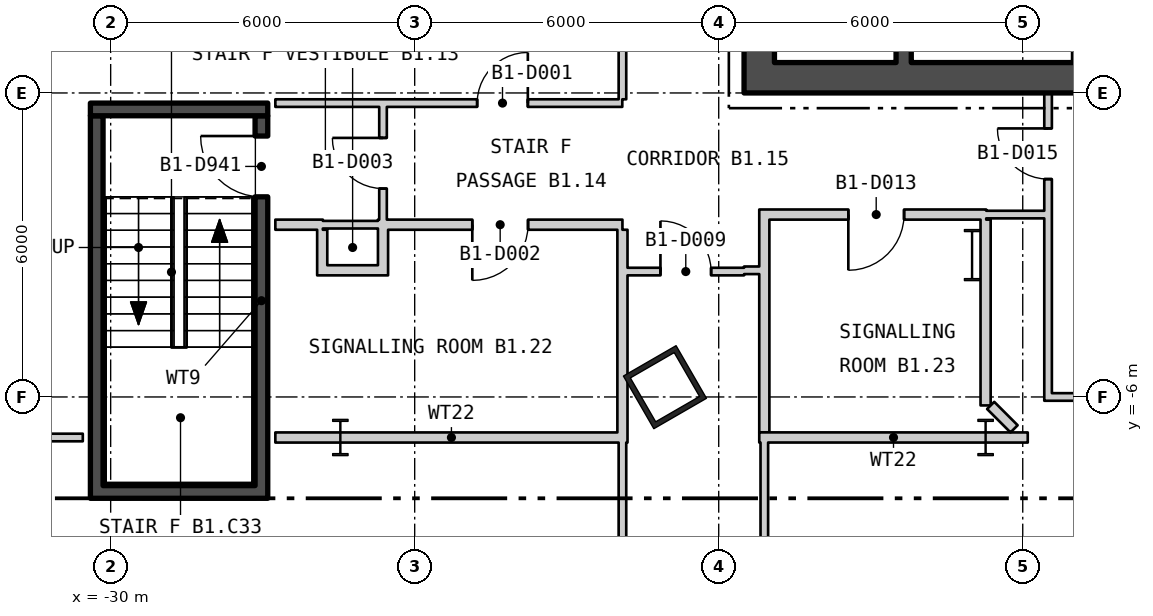
"""IFC4 building model, lengths in metres.
Left out: names, types, materials, properties, quantities, classifications, styles, units other than length and angle.
Written with IfcOpenShell. Run it as: python <this file> out.ifc"""

import sys

from ifc_helpers import new_model, si_unit, direction, frame, frame_2d, origin, origin_2d, place, context, subcontext, project, spatial, rectangle, hollow_rectangle, i_section, extrude, element, fill, save


model = new_model("IFC4")
c1 = context("Model", 3, precision=1e-05, world=origin(), true_north=direction((0.0, 1.0)))
c2 = subcontext(c1, "Body", "Model", "MODEL_VIEW")
j1 = project(units=[si_unit("LENGTHUNIT", "METRE"), si_unit("PLANEANGLEUNIT", "RADIAN")], contexts=[c1])
p1 = place(None, origin())
s1 = spatial("IfcSite", under=j1, at=p1, CompositionType="ELEMENT")
p2 = place(p1, origin())
s2 = spatial("IfcBuilding", under=s1, at=p2, CompositionType="ELEMENT")
p3 = place(p2, frame((0.0, 0.0, -5.7)))
s3 = spatial("IfcBuildingStorey", under=s2, at=p3, CompositionType="ELEMENT", Elevation=-5.7)
p4 = place(p3, frame((-19.061, -5.807, 0.0), z_axis=(0.0, 0.0, 1.0), x_axis=(0.5, -0.866025403784, 0.0)))
e1 = element("IfcColumn", 1, at=p4, inside=s3, PredefinedType="COLUMN", context=c2, shape_type="SweptSolid", body=[
    extrude(hollow_rectangle(XDim=1.2, YDim=1.2, WallThickness=0.1, at=origin_2d()), origin(), (0.0, 0.0, 1.0), 5.7),
])
p5 = place(p3, frame((-13.0, -3.2, 0.0), z_axis=(0.0, 0.0, 1.0), x_axis=(1.0, 0.0, 0.0)))
e2 = element("IfcColumn", 2, at=p5, inside=s3, PredefinedType="COLUMN", context=c2, shape_type="SweptSolid", body=[
    extrude(i_section(OverallWidth=0.302, OverallDepth=1.008, WebThickness=0.021, FlangeThickness=0.04, at=origin_2d()), origin(), (0.0, 0.0, 1.0), 5.7),
])
p6 = place(p3, frame((-25.467, -6.8, 0.0), z_axis=(0.0, 0.0, 1.0), x_axis=(1.0, 0.0, 0.0)))
e3 = element("IfcColumn", 3, at=p6, inside=s3, PredefinedType="COLUMN", context=c2, shape_type="SweptSolid", body=[
    extrude(i_section(OverallWidth=0.304, OverallDepth=0.716, WebThickness=0.021, FlangeThickness=0.04, at=origin_2d()), origin(), (0.0, 0.0, 1.0), 5.7),
])
p7 = place(p3, frame((-12.733, -6.8, 0.0), z_axis=(0.0, 0.0, 1.0), x_axis=(1.0, 0.0, 0.0)))
e4 = element("IfcColumn", 4, at=p7, inside=s3, PredefinedType="COLUMN", context=c2, shape_type="SweptSolid", body=[
    extrude(i_section(OverallWidth=0.304, OverallDepth=0.716, WebThickness=0.021, FlangeThickness=0.04, at=origin_2d()), origin(), (0.0, 0.0, 1.0), 5.25),
])
p8 = place(p3, frame((-17.5, 0.3, 0.0), z_axis=(0.0, 0.0, 1.0), x_axis=(1.0, 0.0, 0.0)))
e5 = element("IfcWall", 5, at=p8, inside=s3, PredefinedType="SHEAR", context=c2, shape_type="SweptSolid", body=[
    extrude(rectangle(XDim=35.0, YDim=0.6, at=frame_2d((17.5, 0.0))), origin(), (0.0, 0.0, 1.0), 5.25),
])
p9 = place(p8, frame((12.0, 0.0, 0.0)))
e6 = element("IfcOpeningElement", 6, at=p9, cuts=e5, PredefinedType="OPENING", context=c2, shape_type="SweptSolid", body=[
    extrude(rectangle(XDim=1.8, YDim=2.4, at=frame_2d((0.9, 1.2))), frame((0.0, 0.31, 0.0), z_axis=(0.0, -1.0, 0.0), x_axis=(1.0, 0.0, 0.0)), (0.0, 0.0, 1.0), 0.62),
])
p10 = place(p8, frame((22.0, 0.0, 0.0)))
e7 = element("IfcOpeningElement", 7, at=p10, cuts=e5, PredefinedType="OPENING", context=c2, shape_type="SweptSolid", body=[
    extrude(rectangle(XDim=1.8, YDim=2.4, at=frame_2d((0.9, 1.2))), frame((0.0, 0.31, 0.0), z_axis=(0.0, -1.0, 0.0), x_axis=(1.0, 0.0, 0.0)), (0.0, 0.0, 1.0), 0.62),
])
p11 = place(p3, frame((-17.2, 0.6, 0.0), z_axis=(0.0, 0.0, 1.0), x_axis=(0.0, 1.0, 0.0)))
e8 = element("IfcWall", 8, at=p11, inside=s3, PredefinedType="SHEAR", context=c2, shape_type="SweptSolid", body=[
    extrude(rectangle(XDim=16.8, YDim=0.6, at=frame_2d((8.4, 0.0))), origin(), (0.0, 0.0, 1.0), 5.25),
])
p12 = place(p11, frame((5.7, 0.0, 0.0)))
e9 = element("IfcOpeningElement", 9, at=p12, cuts=e8, PredefinedType="OPENING", context=c2, shape_type="SweptSolid", body=[
    extrude(rectangle(XDim=1.5, YDim=2.1, at=frame_2d((0.75, 1.05))), frame((0.0, 0.31, 0.0), z_axis=(0.0, -1.0, 0.0), x_axis=(1.0, 0.0, 0.0)), (0.0, 0.0, 1.0), 0.62),
])
p13 = place(p11, frame((0.571, 0.0, 0.0)))
e10 = element("IfcOpeningElement", 10, at=p13, cuts=e8, PredefinedType="OPENING", context=c2, shape_type="SweptSolid", body=[
    extrude(rectangle(XDim=0.9, YDim=2.1, at=frame_2d((0.45, 1.05))), frame((0.0, 0.31, 0.0), z_axis=(0.0, -1.0, 0.0), x_axis=(1.0, 0.0, 0.0)), (0.0, 0.0, 1.0), 0.62),
])
p14 = place(p11, frame((3.421, 0.0, 0.0)))
e11 = element("IfcOpeningElement", 11, at=p14, cuts=e8, PredefinedType="OPENING", context=c2, shape_type="SweptSolid", body=[
    extrude(rectangle(XDim=0.9, YDim=2.1, at=frame_2d((0.45, 1.05))), frame((0.0, 0.31, 0.0), z_axis=(0.0, -1.0, 0.0), x_axis=(1.0, 0.0, 0.0)), (0.0, 0.0, 1.0), 0.62),
])
p15 = place(p11, frame((9.473, 0.0, 0.0)))
e12 = element("IfcOpeningElement", 12, at=p15, cuts=e8, PredefinedType="OPENING", context=c2, shape_type="SweptSolid", body=[
    extrude(rectangle(XDim=1.0, YDim=2.1, at=frame_2d((0.5, 1.05))), frame((0.0, 0.31, 0.0), z_axis=(0.0, -1.0, 0.0), x_axis=(1.0, 0.0, 0.0)), (0.0, 0.0, 1.0), 0.62),
])
p16 = place(p11, frame((14.323, 0.0, 0.0)))
e13 = element("IfcOpeningElement", 13, at=p16, cuts=e8, PredefinedType="OPENING", context=c2, shape_type="SweptSolid", body=[
    extrude(rectangle(XDim=0.9, YDim=2.1, at=frame_2d((0.45, 1.05))), frame((0.0, 0.31, 0.0), z_axis=(0.0, -1.0, 0.0), x_axis=(1.0, 0.0, 0.0)), (0.0, 0.0, 1.0), 0.62),
])
p17 = place(p3, frame((-14.35, 0.6, 0.0), z_axis=(0.0, 0.0, 1.0), x_axis=(0.0, 1.0, 0.0)))
e14 = element("IfcWall", 14, at=p17, inside=s3, PredefinedType="SHEAR", context=c2, shape_type="SweptSolid", body=[
    extrude(rectangle(XDim=16.8, YDim=0.3, at=frame_2d((8.4, 0.0))), origin(), (0.0, 0.0, 1.0), 5.25),
])
p18 = place(p17, frame((5.7, 0.0, 0.0)))
e15 = element("IfcOpeningElement", 15, at=p18, cuts=e14, PredefinedType="OPENING", context=c2, shape_type="SweptSolid", body=[
    extrude(rectangle(XDim=1.5, YDim=2.1, at=frame_2d((0.75, 1.05))), frame((0.0, 0.16, 0.0), z_axis=(0.0, -1.0, 0.0), x_axis=(1.0, 0.0, 0.0)), (0.0, 0.0, 1.0), 0.32),
])
p19 = place(p3, frame((-30.275, -7.75, 0.0), z_axis=(0.0, 0.0, 1.0), x_axis=(0.0, 1.0, 0.0)))
e16 = element("IfcWall", 16, at=p19, inside=s3, PredefinedType="SHEAR", context=c2, shape_type="SweptSolid", body=[
    extrude(rectangle(XDim=7.3, YDim=0.25, at=frame_2d((3.65, 0.0))), origin(), (0.0, 0.0, 1.0), 5.25),
])
p20 = place(p3, frame((-27.025, -7.75, 0.0), z_axis=(0.0, 0.0, 1.0), x_axis=(0.0, 1.0, 0.0)))
e17 = element("IfcWall", 17, at=p20, inside=s3, PredefinedType="SHEAR", context=c2, shape_type="SweptSolid", body=[
    extrude(rectangle(XDim=7.3, YDim=0.25, at=frame_2d((3.65, 0.0))), origin(), (0.0, 0.0, 1.0), 5.25),
])
p21 = place(p20, frame((5.7, 0.0, 0.0)))
e18 = element("IfcOpeningElement", 18, at=p21, cuts=e17, PredefinedType="OPENING", context=c2, shape_type="SweptSolid", body=[
    extrude(rectangle(XDim=1.2, YDim=2.1, at=frame_2d((0.6, 1.05))), frame((0.0, 0.135, 0.0), z_axis=(0.0, -1.0, 0.0), x_axis=(1.0, 0.0, 0.0)), (0.0, 0.0, 1.0), 0.27),
])
for number, where, z_axis, x_axis in (
    (19, (-30.4, -7.875, 0.0), (0.0, 0.0, 1.0), (1.0, 0.0, 0.0)),
    (20, (-30.4, -0.325, 0.0), (0.0, 0.0, 1.0), (1.0, 0.0, 0.0)),
):
    element("IfcWall", number, at=place(p3, frame(where, z_axis=z_axis, x_axis=x_axis)), inside=s3, PredefinedType="SHEAR", context=c2, shape_type="SweptSolid", body=[
        extrude(rectangle(XDim=3.5, YDim=0.25, at=frame_2d((1.75, 0.0))), origin(), (0.0, 0.0, 1.0), 5.25),
    ])
p22 = place(p3, frame((-38.1, -6.8, 0.0), z_axis=(0.0, 0.0, 1.0), x_axis=(1.0, 0.0, 0.0)))
e21 = element("IfcWall", 21, at=p22, inside=s3, PredefinedType="PARTITIONING", context=c2, shape_type="SweptSolid", body=[
    extrude(rectangle(XDim=7.55, YDim=0.15, at=frame_2d((3.775, 0.0))), origin(), (0.0, 0.0, 1.0), 5.25),
])
p23 = place(p3, frame((-26.75, -6.8, 0.0), z_axis=(0.0, 0.0, 1.0), x_axis=(1.0, 0.0, 0.0)))
e22 = element("IfcWall", 22, at=p23, inside=s3, PredefinedType="PARTITIONING", context=c2, shape_type="SweptSolid", body=[
    extrude(rectangle(XDim=6.95, YDim=0.2, at=frame_2d((3.475, 0.0))), origin(), (0.0, 0.0, 1.0), 5.25),
])
p24 = place(p3, frame((-26.75, -2.6, 0.0), z_axis=(0.0, 0.0, 1.0), x_axis=(1.0, 0.0, 0.0)))
e23 = element("IfcWall", 23, at=p24, inside=s3, PredefinedType="PARTITIONING", context=c2, shape_type="SweptSolid", body=[
    extrude(rectangle(XDim=0.937, YDim=0.2, at=frame_2d((0.469, 0.0))), origin(), (0.0, 0.0, 1.0), 5.25),
])
p25 = place(p3, frame((-26.75, -0.2, 0.0), z_axis=(0.0, 0.0, 1.0), x_axis=(1.0, 0.0, 0.0)))
e24 = element("IfcWall", 24, at=p25, inside=s3, PredefinedType="PARTITIONING", context=c2, shape_type="SweptSolid", body=[
    extrude(rectangle(XDim=6.847, YDim=0.15, at=frame_2d((3.424, 0.0))), origin(), (0.0, 0.0, 1.0), 5.25),
])
p26 = place(p25, frame((3.983, 0.0, 0.0)))
e25 = element("IfcOpeningElement", 25, at=p26, cuts=e24, PredefinedType="OPENING", context=c2, shape_type="SweptSolid", body=[
    extrude(rectangle(XDim=1.0, YDim=2.1, at=frame_2d((0.5, 1.05))), frame((0.0, 0.085, 0.0), z_axis=(0.0, -1.0, 0.0), x_axis=(1.0, 0.0, 0.0)), (0.0, 0.0, 1.0), 0.17),
])
p27 = place(p3, frame((-25.925, -3.5, 0.0), z_axis=(0.0, 0.0, 1.0), x_axis=(1.0, 0.0, 0.0)))
e26 = element("IfcWall", 26, at=p27, inside=s3, PredefinedType="PARTITIONING", context=c2, shape_type="SweptSolid", body=[
    extrude(rectangle(XDim=1.4, YDim=0.2, at=frame_2d((0.7, 0.0))), origin(), (0.0, 0.0, 1.0), 5.25),
])
p28 = place(p3, frame((-25.825, -3.4, 0.0), z_axis=(0.0, 0.0, 1.0), x_axis=(0.0, 1.0, 0.0)))
e27 = element("IfcWall", 27, at=p28, inside=s3, PredefinedType="PARTITIONING", context=c2, shape_type="SweptSolid", body=[
    extrude(rectangle(XDim=0.7, YDim=0.2, at=frame_2d((0.35, 0.0))), origin(), (0.0, 0.0, 1.0), 5.25),
])
p29 = place(p3, frame((-25.813, -2.6, 0.0), z_axis=(0.0, 0.0, 1.0), x_axis=(1.0, 0.0, 0.0)))
e28 = element("IfcWall", 28, at=p29, inside=s3, PredefinedType="PARTITIONING", context=c2, shape_type="SweptSolid", body=[
    extrude(rectangle(XDim=1.088, YDim=0.15, at=frame_2d((0.544, 0.0))), origin(), (0.0, 0.0, 1.0), 5.25),
])
p30 = place(p3, frame((-24.725, -2.6, 0.0), z_axis=(0.0, 0.0, 1.0), x_axis=(1.0, 0.0, 0.0)))
e29 = element("IfcWall", 29, at=p30, inside=s3, PredefinedType="PARTITIONING", context=c2, shape_type="SweptSolid", body=[
    extrude(rectangle(XDim=4.825, YDim=0.2, at=frame_2d((2.413, 0.0))), origin(), (0.0, 0.0, 1.0), 5.25),
])
p31 = place(p30, frame((1.862, 0.0, 0.0)))
e30 = element("IfcOpeningElement", 30, at=p31, cuts=e29, PredefinedType="OPENING", context=c2, shape_type="SweptSolid", body=[
    extrude(rectangle(XDim=1.1, YDim=2.1, at=frame_2d((0.55, 1.05))), frame((0.0, 0.11, 0.0), z_axis=(0.0, -1.0, 0.0), x_axis=(1.0, 0.0, 0.0)), (0.0, 0.0, 1.0), 0.22),
])
p32 = place(p3, frame((-24.625, -3.4, 0.0), z_axis=(0.0, 0.0, 1.0), x_axis=(0.0, 1.0, 0.0)))
e31 = element("IfcWall", 31, at=p32, inside=s3, PredefinedType="PARTITIONING", context=c2, shape_type="SweptSolid", body=[
    extrude(rectangle(XDim=0.7, YDim=0.2, at=frame_2d((0.35, 0.0))), origin(), (0.0, 0.0, 1.0), 5.25),
])
p33 = place(p3, frame((-24.625, -2.5, 0.0), z_axis=(0.0, 0.0, 1.0), x_axis=(0.0, 1.0, 0.0)))
e32 = element("IfcWall", 32, at=p33, inside=s3, PredefinedType="PARTITIONING", context=c2, shape_type="SweptSolid", body=[
    extrude(rectangle(XDim=2.225, YDim=0.15, at=frame_2d((1.113, 0.0))), origin(), (0.0, 0.0, 1.0), 5.25),
])
p34 = place(p33, frame((0.613, 0.0, 0.0)))
e33 = element("IfcOpeningElement", 33, at=p34, cuts=e32, PredefinedType="OPENING", context=c2, shape_type="SweptSolid", body=[
    extrude(rectangle(XDim=1.0, YDim=2.1, at=frame_2d((0.5, 1.05))), frame((0.0, 0.085, 0.0), z_axis=(0.0, -1.0, 0.0), x_axis=(1.0, 0.0, 0.0)), (0.0, 0.0, 1.0), 0.17),
])
p35 = place(p3, frame((-19.9, -23.775, 0.0), z_axis=(0.0, 0.0, 1.0), x_axis=(0.0, 1.0, 0.0)))
e34 = element("IfcWall", 34, at=p35, inside=s3, PredefinedType="PARTITIONING", context=c2, shape_type="SweptSolid", body=[
    extrude(rectangle(XDim=16.875, YDim=0.15, at=frame_2d((8.438, 0.0))), origin(), (0.0, 0.0, 1.0), 5.25),
])
p36 = place(p35, frame((2.993, 0.0, 0.0)))
e35 = element("IfcOpeningElement", 35, at=p36, cuts=e34, PredefinedType="OPENING", context=c2, shape_type="SweptSolid", body=[
    extrude(rectangle(XDim=1.0, YDim=2.1, at=frame_2d((0.5, 1.05))), frame((0.0, 0.085, 0.0), z_axis=(0.0, -1.0, 0.0), x_axis=(1.0, 0.0, 0.0)), (0.0, 0.0, 1.0), 0.17),
])
p37 = place(p35, frame((12.35, 0.0, 0.0)))
e36 = element("IfcOpeningElement", 36, at=p37, cuts=e34, PredefinedType="OPENING", context=c2, shape_type="SweptSolid", body=[
    extrude(rectangle(XDim=1.0, YDim=2.1, at=frame_2d((0.5, 1.05))), frame((0.0, 0.085, 0.0), z_axis=(0.0, -1.0, 0.0), x_axis=(1.0, 0.0, 0.0)), (0.0, 0.0, 1.0), 0.17),
])
p38 = place(p3, frame((-19.9, -6.7, 0.0), z_axis=(0.0, 0.0, 1.0), x_axis=(0.0, 1.0, 0.0)))
e37 = element("IfcWall", 37, at=p38, inside=s3, PredefinedType="PARTITIONING", context=c2, shape_type="SweptSolid", body=[
    extrude(rectangle(XDim=4.0, YDim=0.2, at=frame_2d((2.0, 0.0))), origin(), (0.0, 0.0, 1.0), 5.25),
])
p39 = place(p3, frame((-19.9, -0.125, 0.0), z_axis=(0.0, 0.0, 1.0), x_axis=(0.0, 1.0, 0.0)))
e38 = element("IfcWall", 38, at=p39, inside=s3, PredefinedType="PARTITIONING", context=c2, shape_type="SweptSolid", body=[
    extrude(rectangle(XDim=1.15, YDim=0.15, at=frame_2d((0.575, 0.0))), origin(), (0.0, 0.0, 1.0), 5.25),
])
p40 = place(p3, frame((-19.8, -3.525, 0.0), z_axis=(0.0, 0.0, 1.0), x_axis=(1.0, 0.0, 0.0)))
e39 = element("IfcWall", 39, at=p40, inside=s3, PredefinedType="PARTITIONING", context=c2, shape_type="SweptSolid", body=[
    extrude(rectangle(XDim=2.3, YDim=0.15, at=frame_2d((1.15, 0.0))), origin(), (0.0, 0.0, 1.0), 5.25),
])
p41 = place(p40, frame((0.65, 0.0, 0.0)))
e40 = element("IfcOpeningElement", 40, at=p41, cuts=e39, PredefinedType="OPENING", context=c2, shape_type="SweptSolid", body=[
    extrude(rectangle(XDim=1.0, YDim=2.1, at=frame_2d((0.5, 1.05))), frame((0.0, 0.085, 0.0), z_axis=(0.0, -1.0, 0.0), x_axis=(1.0, 0.0, 0.0)), (0.0, 0.0, 1.0), 0.17),
])
p42 = place(p3, frame((-17.5, -3.5, 0.0), z_axis=(0.0, 0.0, 1.0), x_axis=(1.0, 0.0, 0.0)))
e41 = element("IfcWall", 41, at=p42, inside=s3, PredefinedType="PARTITIONING", context=c2, shape_type="SweptSolid", body=[
    extrude(rectangle(XDim=0.3, YDim=0.15, at=frame_2d((0.15, 0.0))), origin(), (0.0, 0.0, 1.0), 5.25),
])
p43 = place(p3, frame((-17.2, -6.799, 0.0), z_axis=(0.0, 0.0, 1.0), x_axis=(0.999999982193, -0.000188714848, 0.0)))
e42 = element("IfcWall", 42, at=p43, inside=s3, PredefinedType="PARTITIONING", context=c2, shape_type="SweptSolid", body=[
    extrude(rectangle(XDim=5.299, YDim=0.2, at=frame_2d((2.65, 0.0))), origin(), (0.0, 0.0, 1.0), 5.25),
])
p44 = place(p3, frame((-17.1, -12.79, 0.0), z_axis=(0.0, 0.0, 1.0), x_axis=(0.0, 1.0, 0.0)))
e43 = element("IfcWall", 43, at=p44, inside=s3, PredefinedType="PARTITIONING", context=c2, shape_type="SweptSolid", body=[
    extrude(rectangle(XDim=5.891, YDim=0.15, at=frame_2d((2.946, 0.0))), origin(), (0.0, 0.0, 1.0), 5.25),
])
p45 = place(p44, frame((2.033, 0.0, 0.0)))
e44 = element("IfcOpeningElement", 44, at=p45, cuts=e43, PredefinedType="OPENING", context=c2, shape_type="SweptSolid", body=[
    extrude(rectangle(XDim=1.8, YDim=2.1, at=frame_2d((0.9, 1.05))), frame((0.0, 0.085, 0.0), z_axis=(0.0, -1.0, 0.0), x_axis=(1.0, 0.0, 0.0)), (0.0, 0.0, 1.0), 0.17),
])
p46 = place(p3, frame((-17.1, -6.699, 0.0), z_axis=(0.0, 0.0, 1.0), x_axis=(0.0, 1.0, 0.0)))
e45 = element("IfcWall", 45, at=p46, inside=s3, PredefinedType="PARTITIONING", context=c2, shape_type="SweptSolid", body=[
    extrude(rectangle(XDim=4.399, YDim=0.2, at=frame_2d((2.2, 0.0))), origin(), (0.0, 0.0, 1.0), 5.25),
])
p47 = place(p3, frame((-17.0, -2.4, 0.0), z_axis=(0.0, 0.0, 1.0), x_axis=(1.0, 0.0, 0.0)))
e46 = element("IfcWall", 46, at=p47, inside=s3, PredefinedType="PARTITIONING", context=c2, shape_type="SweptSolid", body=[
    extrude(rectangle(XDim=4.279, YDim=0.2, at=frame_2d((2.139, 0.0))), origin(), (0.0, 0.0, 1.0), 5.25),
])
p48 = place(p47, frame((1.558, 0.0, 0.0)))
e47 = element("IfcOpeningElement", 47, at=p48, cuts=e46, PredefinedType="OPENING", context=c2, shape_type="SweptSolid", body=[
    extrude(rectangle(XDim=1.1, YDim=2.1, at=frame_2d((0.55, 1.05))), frame((0.0, 0.11, 0.0), z_axis=(0.0, -1.0, 0.0), x_axis=(1.0, 0.0, 0.0)), (0.0, 0.0, 1.0), 0.22),
])
p49 = place(p3, frame((-12.733, -6.167, 0.0), z_axis=(0.0, 0.0, 1.0), x_axis=(0.0, 1.0, 0.0)))
e48 = element("IfcWall", 48, at=p49, inside=s3, PredefinedType="PARTITIONING", context=c2, shape_type="SweptSolid", body=[
    extrude(rectangle(XDim=3.667, YDim=0.2, at=frame_2d((1.833, 0.0))), origin(), (0.0, 0.0, 1.0), 5.25),
])
p50 = place(p3, frame((-12.721, -2.4, 0.0), z_axis=(0.0, 0.0, 1.0), x_axis=(1.0, 0.0, 0.0)))
e49 = element("IfcWall", 49, at=p50, inside=s3, PredefinedType="PARTITIONING", context=c2, shape_type="SweptSolid", body=[
    extrude(rectangle(XDim=1.146, YDim=0.15, at=frame_2d((0.573, 0.0))), origin(), (0.0, 0.0, 1.0), 5.25),
])
p51 = place(p3, frame((-12.633, -6.167, 0.0), z_axis=(0.0, 0.0, 1.0), x_axis=(0.707106781187, -0.707106781187, 0.0)))
e50 = element("IfcWall", 50, at=p51, inside=s3, PredefinedType="PARTITIONING", context=c2, shape_type="SweptSolid", body=[
    extrude(rectangle(XDim=0.653, YDim=0.2, at=frame_2d((0.327, 0.0))), origin(), (0.0, 0.0, 1.0), 5.25),
])
p52 = place(p3, frame((-11.5, -6.075, 0.0), z_axis=(0.0, 0.0, 1.0), x_axis=(0.0, 1.0, 0.0)))
e51 = element("IfcWall", 51, at=p52, inside=s3, PredefinedType="PARTITIONING", context=c2, shape_type="SweptSolid", body=[
    extrude(rectangle(XDim=6.075, YDim=0.15, at=frame_2d((3.038, 0.0))), origin(), (0.0, 0.0, 1.0), 5.25),
])
p53 = place(p52, frame((4.375, 0.0, 0.0)))
e52 = element("IfcOpeningElement", 52, at=p53, cuts=e51, PredefinedType="OPENING", context=c2, shape_type="SweptSolid", body=[
    extrude(rectangle(XDim=1.0, YDim=2.1, at=frame_2d((0.5, 1.05))), frame((0.0, 0.085, 0.0), z_axis=(0.0, -1.0, 0.0), x_axis=(1.0, 0.0, 0.0)), (0.0, 0.0, 1.0), 0.17),
])
p54 = place(p3, frame((-11.425, -6.0, 0.0), z_axis=(0.0, 0.0, 1.0), x_axis=(1.0, 0.0, 0.0)))
e53 = element("IfcWall", 53, at=p54, inside=s3, PredefinedType="PARTITIONING", context=c2, shape_type="SweptSolid", body=[
    extrude(rectangle(XDim=4.983, YDim=0.15, at=frame_2d((2.491, 0.0))), origin(), (0.0, 0.0, 1.0), 5.25),
])
p55 = place(p21, origin())
e54 = element("IfcDoor", 54, at=p55, inside=s3, OperationType="SINGLE_SWING_LEFT", PredefinedType="DOOR", context=c2, shape_type="SweptSolid", body=[
    extrude(rectangle(XDim=1.2, YDim=2.1, at=frame_2d((0.6, 1.05))), frame((0.0, 0.025, 0.0), z_axis=(0.0, -1.0, 0.0), x_axis=(1.0, 0.0, 0.0)), (0.0, 0.0, 1.0), 0.05),
])
fill(e18, e54)
p56 = place(p26, origin())
e55 = element("IfcDoor", 55, at=p56, inside=s3, OperationType="SINGLE_SWING_LEFT", PredefinedType="DOOR", context=c2, shape_type="SweptSolid", body=[
    extrude(rectangle(XDim=1.0, YDim=2.1, at=frame_2d((0.5, 1.05))), frame((0.0, 0.025, 0.0), z_axis=(0.0, -1.0, 0.0), x_axis=(1.0, 0.0, 0.0)), (0.0, 0.0, 1.0), 0.05),
])
fill(e25, e55)
p57 = place(p31, origin())
e56 = element("IfcDoor", 56, at=p57, inside=s3, OperationType="SINGLE_SWING_LEFT", PredefinedType="DOOR", context=c2, shape_type="SweptSolid", body=[
    extrude(rectangle(XDim=1.1, YDim=2.1, at=frame_2d((0.55, 1.05))), frame((0.0, 0.025, 0.0), z_axis=(0.0, -1.0, 0.0), x_axis=(1.0, 0.0, 0.0)), (0.0, 0.0, 1.0), 0.05),
])
fill(e30, e56)
p58 = place(p34, origin())
e57 = element("IfcDoor", 57, at=p58, inside=s3, OperationType="SINGLE_SWING_LEFT", PredefinedType="DOOR", context=c2, shape_type="SweptSolid", body=[
    extrude(rectangle(XDim=1.0, YDim=2.1, at=frame_2d((0.5, 1.05))), frame((0.0, 0.025, 0.0), z_axis=(0.0, -1.0, 0.0), x_axis=(1.0, 0.0, 0.0)), (0.0, 0.0, 1.0), 0.05),
])
fill(e33, e57)
p59 = place(p41, origin())
e58 = element("IfcDoor", 58, at=p59, inside=s3, OperationType="SINGLE_SWING_RIGHT", PredefinedType="DOOR", context=c2, shape_type="SweptSolid", body=[
    extrude(rectangle(XDim=1.0, YDim=2.1, at=frame_2d((0.5, 1.05))), frame((0.0, 0.025, 0.0), z_axis=(0.0, -1.0, 0.0), x_axis=(1.0, 0.0, 0.0)), (0.0, 0.0, 1.0), 0.05),
])
fill(e40, e58)
p60 = place(p48, origin())
e59 = element("IfcDoor", 59, at=p60, inside=s3, OperationType="SINGLE_SWING_LEFT", PredefinedType="DOOR", context=c2, shape_type="SweptSolid", body=[
    extrude(rectangle(XDim=1.1, YDim=2.1, at=frame_2d((0.55, 1.05))), frame((0.0, 0.025, 0.0), z_axis=(0.0, -1.0, 0.0), x_axis=(1.0, 0.0, 0.0)), (0.0, 0.0, 1.0), 0.05),
])
fill(e47, e59)
p61 = place(p53, origin())
e60 = element("IfcDoor", 60, at=p61, inside=s3, OperationType="SINGLE_SWING_LEFT", PredefinedType="DOOR", context=c2, shape_type="SweptSolid", body=[
    extrude(rectangle(XDim=1.0, YDim=2.1, at=frame_2d((0.5, 1.05))), frame((0.0, 0.025, 0.0), z_axis=(0.0, -1.0, 0.0), x_axis=(1.0, 0.0, 0.0)), (0.0, 0.0, 1.0), 0.05),
])
fill(e52, e60)
save(model, sys.argv[1])
